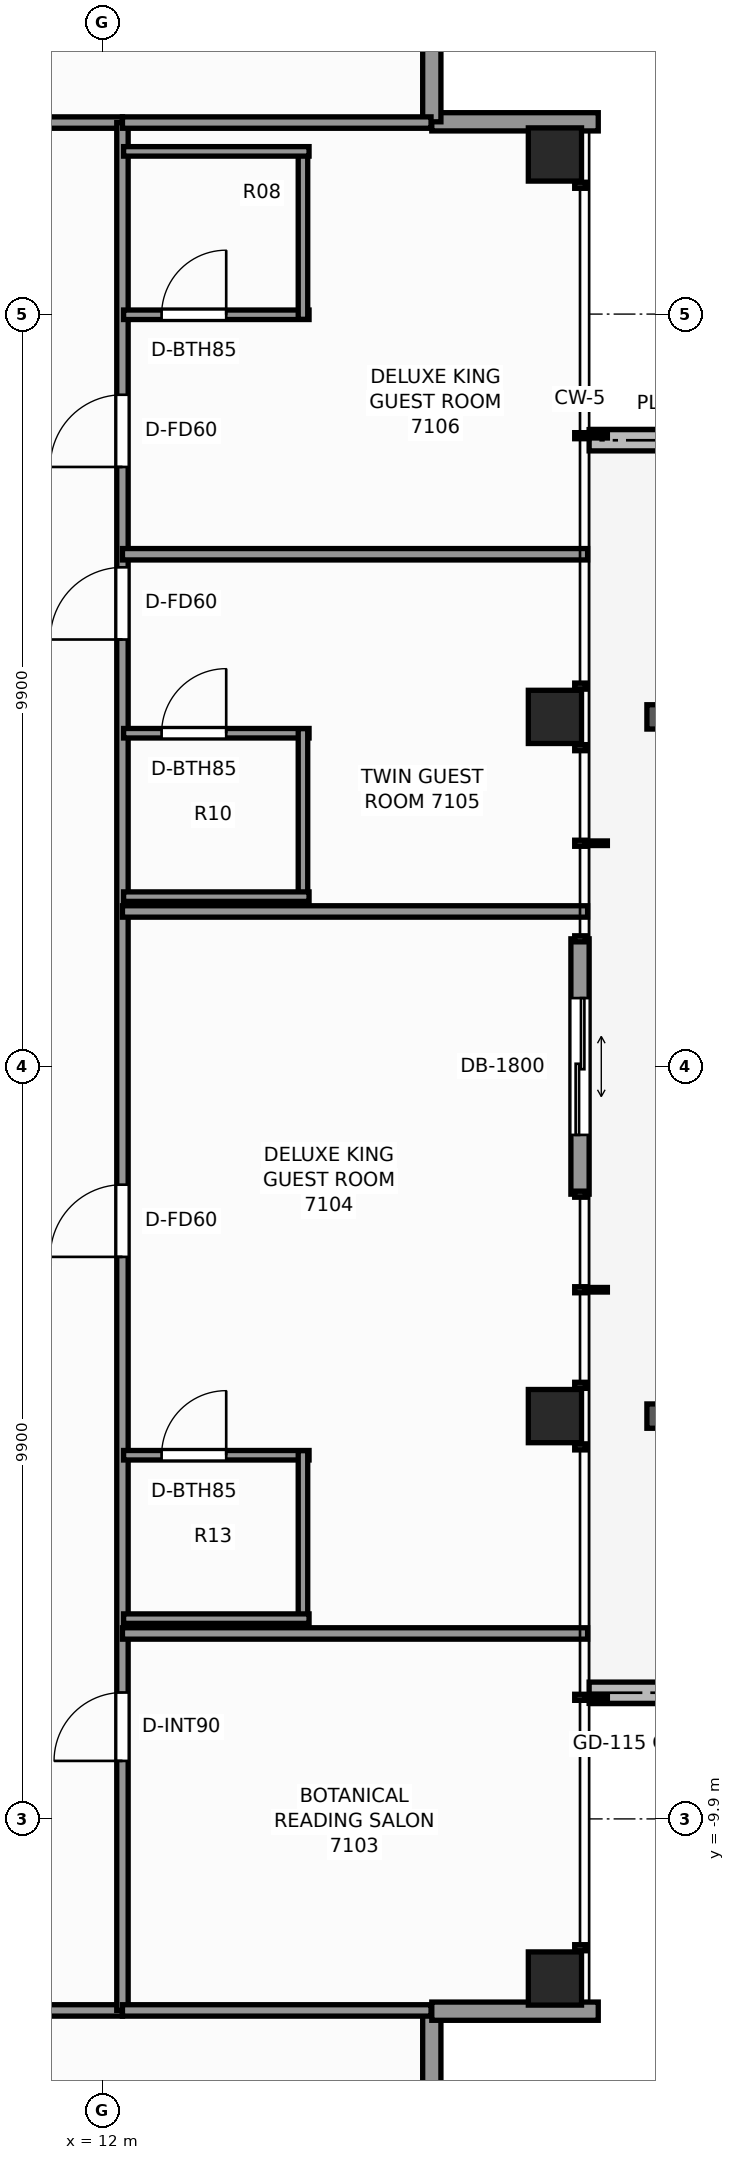
"""IFC4 building model, lengths in metres.
Left out: names, types, materials, properties, quantities, classifications, styles, units other than length and angle.
Written with IfcOpenShell. Run it as: python <this file> out.ifc"""

import sys

from ifc_helpers import new_model, si_unit, direction, frame, frame_2d, origin, origin_2d, place, context, subcontext, project, spatial, rectangle, extrude, element, fill, save


model = new_model("IFC4")
c1 = context("Model", 3, precision=1e-05, world=origin(), true_north=direction((0.0, 1.0)))
c2 = subcontext(c1, "Body", "Model", "MODEL_VIEW")
j1 = project(units=[si_unit("LENGTHUNIT", "METRE"), si_unit("PLANEANGLEUNIT", "RADIAN")], contexts=[c1])
p1 = place(None, origin())
s1 = spatial("IfcSite", under=j1, at=p1, CompositionType="ELEMENT")
p2 = place(p1, origin())
s2 = spatial("IfcBuilding", under=s1, at=p2, CompositionType="ELEMENT")
p3 = place(p2, frame((0.0, 0.0, 244.4)))
s3 = spatial("IfcBuildingStorey", under=s2, at=p3, CompositionType="ELEMENT", Elevation=244.4)
for number, where, z_axis, x_axis in (
    (1, (17.95, -12.0, 0.0), (0.0, 0.0, 1.0), (1.0, 0.0, 0.0)),
    (2, (17.95, -4.6, 0.0), (0.0, 0.0, 1.0), (1.0, 0.0, 0.0)),
    (3, (17.95, 4.6, 0.0), (0.0, 0.0, 1.0), (1.0, 0.0, 0.0)),
    (4, (17.95, 12.0, 0.0), (0.0, 0.0, 1.0), (1.0, 0.0, 0.0)),
):
    element("IfcColumn", number, at=place(p3, frame(where, z_axis=z_axis, x_axis=x_axis)), inside=s3, PredefinedType="COLUMN", context=c2, shape_type="SweptSolid", body=[
        extrude(rectangle(XDim=0.7, YDim=0.7, at=origin_2d()), origin(), (0.0, 0.0, 1.0), 3.5),
    ])
p4 = place(p3, frame((20.74, 8.24, -0.07), z_axis=(0.0, 0.0, 1.0), x_axis=(-1.0, 0.0, 0.0)))
e5 = element("IfcWall", 5, at=p4, inside=s3, PredefinedType="PARAPET", context=c2, shape_type="SweptSolid", body=[
    extrude(rectangle(XDim=2.34, YDim=0.28, at=frame_2d((1.17, 0.0))), origin(), (0.0, 0.0, 1.0), 0.42),
])
p5 = place(p3, frame((18.4, -8.24, -0.07), z_axis=(0.0, 0.0, 1.0), x_axis=(1.0, 0.0, 0.0)))
e6 = element("IfcWall", 6, at=p5, inside=s3, PredefinedType="PARAPET", context=c2, shape_type="SweptSolid", body=[
    extrude(rectangle(XDim=1.313, YDim=0.28, at=frame_2d((0.656, 0.0))), origin(), (0.0, 0.0, 1.0), 0.42),
])
p6 = place(p3, frame((16.33, -12.43, 0.0), z_axis=(0.0, 0.0, 1.0), x_axis=(0.0, -1.0, 0.0)))
e7 = element("IfcWall", 7, at=p6, inside=s3, PredefinedType="STANDARD", context=c2, shape_type="SweptSolid", body=[
    extrude(rectangle(XDim=2.19, YDim=0.24, at=frame_2d((1.095, 0.0))), origin(), (0.0, 0.0, 1.0), 2.633),
])
p7 = place(p3, frame((18.52, -12.43, 0.0), z_axis=(0.0, 0.0, 1.0), x_axis=(-1.0, 0.0, 0.0)))
e8 = element("IfcWall", 8, at=p7, inside=s3, PredefinedType="STANDARD", context=c2, shape_type="SweptSolid", body=[
    extrude(rectangle(XDim=2.19, YDim=0.24, at=frame_2d((1.095, 0.0))), origin(), (0.0, 0.0, 1.0), 2.633),
])
p8 = place(p3, frame((18.28, 1.68, 0.0), z_axis=(0.0, 0.0, 1.0), x_axis=(0.0, -1.0, 0.0)))
e9 = element("IfcWall", 9, at=p8, inside=s3, PredefinedType="STANDARD", context=c2, shape_type="SweptSolid", body=[
    extrude(rectangle(XDim=3.36, YDim=0.24, at=frame_2d((1.68, 0.0))), origin(), (0.0, 0.0, 1.0), 3.25),
])
p9 = place(p8, frame((0.78, 0.0, 0.0)))
e10 = element("IfcOpeningElement", 10, at=p9, cuts=e9, PredefinedType="OPENING", context=c2, shape_type="SweptSolid", body=[
    extrude(rectangle(XDim=1.8, YDim=2.2, at=frame_2d((0.9, 1.1))), frame((0.0, 0.13, 0.0), z_axis=(0.0, -1.0, 0.0), x_axis=(1.0, 0.0, 0.0)), (0.0, 0.0, 1.0), 0.26),
])
p10 = place(p3, frame((16.33, 12.43, 0.0), z_axis=(0.0, 0.0, 1.0), x_axis=(1.0, 0.0, 0.0)))
e11 = element("IfcWall", 11, at=p10, inside=s3, PredefinedType="STANDARD", context=c2, shape_type="SweptSolid", body=[
    extrude(rectangle(XDim=2.19, YDim=0.24, at=frame_2d((1.095, 0.0))), origin(), (0.0, 0.0, 1.0), 2.633),
])
p11 = place(p3, frame((16.33, 14.62, 0.0), z_axis=(0.0, 0.0, 1.0), x_axis=(0.0, -1.0, 0.0)))
e12 = element("IfcWall", 12, at=p11, inside=s3, PredefinedType="STANDARD", context=c2, shape_type="SweptSolid", body=[
    extrude(rectangle(XDim=2.19, YDim=0.24, at=frame_2d((1.095, 0.0))), origin(), (0.0, 0.0, 1.0), 2.633),
])
p12 = place(p3, frame((-12.58, -12.42, 0.0), z_axis=(0.0, 0.0, 1.0), x_axis=(1.0, 0.0, 0.0)))
e13 = element("IfcWall", 13, at=p12, inside=s3, PredefinedType="PARTITIONING", context=c2, shape_type="SweptSolid", body=[
    extrude(rectangle(XDim=24.84, YDim=0.15, at=frame_2d((12.42, 0.0))), origin(), (0.0, 0.0, 1.0), 2.539),
])
p13 = place(p12, frame((4.595, 0.0, 0.0)))
e14 = element("IfcOpeningElement", 14, at=p13, cuts=e13, PredefinedType="OPENING", context=c2, shape_type="SweptSolid", body=[
    extrude(rectangle(XDim=0.9, YDim=2.06, at=frame_2d((0.45, 1.03))), frame((0.0, 0.085, 0.0), z_axis=(0.0, -1.0, 0.0), x_axis=(1.0, 0.0, 0.0)), (0.0, 0.0, 1.0), 0.17),
])
p14 = place(p12, frame((13.406, 0.0, 0.0)))
e15 = element("IfcOpeningElement", 15, at=p14, cuts=e13, PredefinedType="OPENING", context=c2, shape_type="SweptSolid", body=[
    extrude(rectangle(XDim=0.9, YDim=2.06, at=frame_2d((0.45, 1.03))), frame((0.0, 0.085, 0.0), z_axis=(0.0, -1.0, 0.0), x_axis=(1.0, 0.0, 0.0)), (0.0, 0.0, 1.0), 0.17),
])
p15 = place(p12, frame((18.028, 0.0, 0.0)))
e16 = element("IfcOpeningElement", 16, at=p15, cuts=e13, PredefinedType="OPENING", context=c2, shape_type="SweptSolid", body=[
    extrude(rectangle(XDim=0.95, YDim=2.06, at=frame_2d((0.475, 1.03))), frame((0.0, 0.085, 0.0), z_axis=(0.0, -1.0, 0.0), x_axis=(1.0, 0.0, 0.0)), (0.0, 0.0, 1.0), 0.17),
])
p16 = place(p12, frame((20.478, 0.0, 0.0)))
e17 = element("IfcOpeningElement", 17, at=p16, cuts=e13, PredefinedType="OPENING", context=c2, shape_type="SweptSolid", body=[
    extrude(rectangle(XDim=0.9, YDim=2.06, at=frame_2d((0.45, 1.03))), frame((0.0, 0.085, 0.0), z_axis=(0.0, -1.0, 0.0), x_axis=(1.0, 0.0, 0.0)), (0.0, 0.0, 1.0), 0.17),
])
p17 = place(p3, frame((-12.58, 12.42, 0.0), z_axis=(0.0, 0.0, 1.0), x_axis=(1.0, 0.0, 0.0)))
e18 = element("IfcWall", 18, at=p17, inside=s3, PredefinedType="PARTITIONING", context=c2, shape_type="SweptSolid", body=[
    extrude(rectangle(XDim=24.84, YDim=0.15, at=frame_2d((12.42, 0.0))), origin(), (0.0, 0.0, 1.0), 2.539),
])
p18 = place(p17, frame((3.079, 0.0, 0.0)))
e19 = element("IfcOpeningElement", 19, at=p18, cuts=e18, PredefinedType="OPENING", context=c2, shape_type="SweptSolid", body=[
    extrude(rectangle(XDim=0.95, YDim=2.06, at=frame_2d((0.475, 1.03))), frame((0.0, 0.085, 0.0), z_axis=(0.0, -1.0, 0.0), x_axis=(1.0, 0.0, 0.0)), (0.0, 0.0, 1.0), 0.17),
])
p19 = place(p17, frame((10.075, 0.0, 0.0)))
e20 = element("IfcOpeningElement", 20, at=p19, cuts=e18, PredefinedType="OPENING", context=c2, shape_type="SweptSolid", body=[
    extrude(rectangle(XDim=0.95, YDim=2.06, at=frame_2d((0.475, 1.03))), frame((0.0, 0.085, 0.0), z_axis=(0.0, -1.0, 0.0), x_axis=(1.0, 0.0, 0.0)), (0.0, 0.0, 1.0), 0.17),
])
p20 = place(p17, frame((19.64, 0.0, 0.0)))
e21 = element("IfcOpeningElement", 21, at=p20, cuts=e18, PredefinedType="OPENING", context=c2, shape_type="SweptSolid", body=[
    extrude(rectangle(XDim=0.95, YDim=2.06, at=frame_2d((0.475, 1.03))), frame((0.0, 0.085, 0.0), z_axis=(0.0, -1.0, 0.0), x_axis=(1.0, 0.0, 0.0)), (0.0, 0.0, 1.0), 0.17),
])
p21 = place(p3, frame((12.26, -12.42, 0.0), z_axis=(0.0, 0.0, 1.0), x_axis=(0.0, 1.0, 0.0)))
e22 = element("IfcWall", 22, at=p21, inside=s3, PredefinedType="PARTITIONING", context=c2, shape_type="SweptSolid", body=[
    extrude(rectangle(XDim=24.84, YDim=0.15, at=frame_2d((12.42, 0.0))), origin(), (0.0, 0.0, 1.0), 2.539),
])
p22 = place(p21, frame((3.283, 0.0, 0.0)))
e23 = element("IfcOpeningElement", 23, at=p22, cuts=e22, PredefinedType="OPENING", context=c2, shape_type="SweptSolid", body=[
    extrude(rectangle(XDim=0.9, YDim=2.06, at=frame_2d((0.45, 1.03))), frame((0.0, 0.085, 0.0), z_axis=(0.0, -1.0, 0.0), x_axis=(1.0, 0.0, 0.0)), (0.0, 0.0, 1.0), 0.17),
])
p23 = place(p21, frame((9.915, 0.0, 0.0)))
e24 = element("IfcOpeningElement", 24, at=p23, cuts=e22, PredefinedType="OPENING", context=c2, shape_type="SweptSolid", body=[
    extrude(rectangle(XDim=0.95, YDim=2.06, at=frame_2d((0.475, 1.03))), frame((0.0, 0.085, 0.0), z_axis=(0.0, -1.0, 0.0), x_axis=(1.0, 0.0, 0.0)), (0.0, 0.0, 1.0), 0.17),
])
p24 = place(p21, frame((18.038, 0.0, 0.0)))
e25 = element("IfcOpeningElement", 25, at=p24, cuts=e22, PredefinedType="OPENING", context=c2, shape_type="SweptSolid", body=[
    extrude(rectangle(XDim=0.95, YDim=2.06, at=frame_2d((0.475, 1.03))), frame((0.0, 0.085, 0.0), z_axis=(0.0, -1.0, 0.0), x_axis=(1.0, 0.0, 0.0)), (0.0, 0.0, 1.0), 0.17),
])
p25 = place(p21, frame((20.309, 0.0, 0.0)))
e26 = element("IfcOpeningElement", 26, at=p25, cuts=e22, PredefinedType="OPENING", context=c2, shape_type="SweptSolid", body=[
    extrude(rectangle(XDim=0.95, YDim=2.06, at=frame_2d((0.475, 1.03))), frame((0.0, 0.085, 0.0), z_axis=(0.0, -1.0, 0.0), x_axis=(1.0, 0.0, 0.0)), (0.0, 0.0, 1.0), 0.17),
])
for number, where, z_axis, x_axis in (
    (27, (12.26, -12.42, 0.0), (0.0, 0.0, 1.0), (1.0, 0.0, 0.0)),
    (28, (12.26, 12.42, 0.0), (0.0, 0.0, 1.0), (1.0, 0.0, 0.0)),
):
    element("IfcWall", number, at=place(p3, frame(where, z_axis=z_axis, x_axis=x_axis)), inside=s3, PredefinedType="PARTITIONING", context=c2, shape_type="SweptSolid", body=[
        extrude(rectangle(XDim=4.06, YDim=0.15, at=frame_2d((2.03, 0.0))), origin(), (0.0, 0.0, 1.0), 3.25),
    ])
for number, where, z_axis, x_axis in (
    (29, (12.26, -7.46, 0.0), (0.0, 0.0, 1.0), (1.0, 0.0, 0.0)),
    (30, (12.26, 2.04, 0.0), (0.0, 0.0, 1.0), (1.0, 0.0, 0.0)),
):
    element("IfcWall", number, at=place(p3, frame(where, z_axis=z_axis, x_axis=x_axis)), inside=s3, PredefinedType="PARTITIONING", context=c2, shape_type="SweptSolid", body=[
        extrude(rectangle(XDim=6.12, YDim=0.15, at=frame_2d((3.06, 0.0))), origin(), (0.0, 0.0, 1.0), 2.623),
    ])
p26 = place(p3, frame((12.275, -5.115, 0.0), z_axis=(0.0, 0.0, 1.0), x_axis=(1.0, 0.0, 0.0)))
e31 = element("IfcWall", 31, at=p26, inside=s3, PredefinedType="PARTITIONING", context=c2, shape_type="SweptSolid", body=[
    extrude(rectangle(XDim=2.44, YDim=0.125, at=frame_2d((1.22, 0.0))), origin(), (0.0, 0.0, 1.0), 3.25),
])
p27 = place(p26, frame((0.5, 0.0, 0.0)))
e32 = element("IfcOpeningElement", 32, at=p27, cuts=e31, PredefinedType="OPENING", context=c2, shape_type="SweptSolid", body=[
    extrude(rectangle(XDim=0.85, YDim=2.03, at=frame_2d((0.425, 1.015))), frame((0.0, 0.073, 0.0), z_axis=(0.0, -1.0, 0.0), x_axis=(1.0, 0.0, 0.0)), (0.0, 0.0, 1.0), 0.145),
])
p28 = place(p3, frame((14.635, -7.325, 0.0), z_axis=(0.0, 0.0, 1.0), x_axis=(0.0, 1.0, 0.0)))
e33 = element("IfcWall", 33, at=p28, inside=s3, PredefinedType="PARTITIONING", context=c2, shape_type="SweptSolid", body=[
    extrude(rectangle(XDim=2.27, YDim=0.125, at=frame_2d((1.135, 0.0))), origin(), (0.0, 0.0, 1.0), 3.25),
])
p29 = place(p3, frame((12.275, -7.265, 0.0), z_axis=(0.0, 0.0, 1.0), x_axis=(1.0, 0.0, 0.0)))
e34 = element("IfcWall", 34, at=p29, inside=s3, PredefinedType="PARTITIONING", context=c2, shape_type="SweptSolid", body=[
    extrude(rectangle(XDim=2.44, YDim=0.125, at=frame_2d((1.22, 0.0))), origin(), (0.0, 0.0, 1.0), 3.25),
])
p30 = place(p3, frame((12.26, 6.74, 0.0), z_axis=(0.0, 0.0, 1.0), x_axis=(1.0, 0.0, 0.0)))
e35 = element("IfcWall", 35, at=p30, inside=s3, PredefinedType="PARTITIONING", context=c2, shape_type="SweptSolid", body=[
    extrude(rectangle(XDim=6.12, YDim=0.15, at=frame_2d((3.06, 0.0))), origin(), (0.0, 0.0, 1.0), 2.623),
])
p31 = place(p3, frame((12.275, 4.385, 0.0), z_axis=(0.0, 0.0, 1.0), x_axis=(1.0, 0.0, 0.0)))
e36 = element("IfcWall", 36, at=p31, inside=s3, PredefinedType="PARTITIONING", context=c2, shape_type="SweptSolid", body=[
    extrude(rectangle(XDim=2.44, YDim=0.125, at=frame_2d((1.22, 0.0))), origin(), (0.0, 0.0, 1.0), 2.539),
])
p32 = place(p31, frame((0.5, 0.0, 0.0)))
e37 = element("IfcOpeningElement", 37, at=p32, cuts=e36, PredefinedType="OPENING", context=c2, shape_type="SweptSolid", body=[
    extrude(rectangle(XDim=0.85, YDim=2.03, at=frame_2d((0.425, 1.015))), frame((0.0, 0.073, 0.0), z_axis=(0.0, -1.0, 0.0), x_axis=(1.0, 0.0, 0.0)), (0.0, 0.0, 1.0), 0.145),
])
p33 = place(p3, frame((14.635, 2.175, 0.0), z_axis=(0.0, 0.0, 1.0), x_axis=(0.0, 1.0, 0.0)))
e38 = element("IfcWall", 38, at=p33, inside=s3, PredefinedType="PARTITIONING", context=c2, shape_type="SweptSolid", body=[
    extrude(rectangle(XDim=2.27, YDim=0.125, at=frame_2d((1.135, 0.0))), origin(), (0.0, 0.0, 1.0), 2.539),
])
p34 = place(p3, frame((12.275, 2.235, 0.0), z_axis=(0.0, 0.0, 1.0), x_axis=(1.0, 0.0, 0.0)))
e39 = element("IfcWall", 39, at=p34, inside=s3, PredefinedType="PARTITIONING", context=c2, shape_type="SweptSolid", body=[
    extrude(rectangle(XDim=2.44, YDim=0.125, at=frame_2d((1.22, 0.0))), origin(), (0.0, 0.0, 1.0), 3.25),
])
p35 = place(p3, frame((12.275, 9.891, 0.0), z_axis=(0.0, 0.0, 1.0), x_axis=(1.0, 0.0, 0.0)))
e40 = element("IfcWall", 40, at=p35, inside=s3, PredefinedType="PARTITIONING", context=c2, shape_type="SweptSolid", body=[
    extrude(rectangle(XDim=2.44, YDim=0.125, at=frame_2d((1.22, 0.0))), origin(), (0.0, 0.0, 1.0), 3.25),
])
p36 = place(p35, frame((0.5, 0.0, 0.0)))
e41 = element("IfcOpeningElement", 41, at=p36, cuts=e40, PredefinedType="OPENING", context=c2, shape_type="SweptSolid", body=[
    extrude(rectangle(XDim=0.85, YDim=2.03, at=frame_2d((0.425, 1.015))), frame((0.0, 0.073, 0.0), z_axis=(0.0, -1.0, 0.0), x_axis=(1.0, 0.0, 0.0)), (0.0, 0.0, 1.0), 0.145),
])
p37 = place(p3, frame((14.635, 9.831, 0.0), z_axis=(0.0, 0.0, 1.0), x_axis=(0.0, 1.0, 0.0)))
e42 = element("IfcWall", 42, at=p37, inside=s3, PredefinedType="PARTITIONING", context=c2, shape_type="SweptSolid", body=[
    extrude(rectangle(XDim=2.27, YDim=0.125, at=frame_2d((1.135, 0.0))), origin(), (0.0, 0.0, 1.0), 2.539),
])
p38 = place(p3, frame((12.275, 12.041, 0.0), z_axis=(0.0, 0.0, 1.0), x_axis=(1.0, 0.0, 0.0)))
e43 = element("IfcWall", 43, at=p38, inside=s3, PredefinedType="PARTITIONING", context=c2, shape_type="SweptSolid", body=[
    extrude(rectangle(XDim=2.44, YDim=0.125, at=frame_2d((1.22, 0.0))), origin(), (0.0, 0.0, 1.0), 3.25),
])
p39 = place(p9, origin())
e44 = element("IfcDoor", 44, at=p39, inside=s3, OperationType="DOUBLE_DOOR_SLIDING", PredefinedType="DOOR", context=c2, shape_type="SweptSolid", body=[
    extrude(rectangle(XDim=1.8, YDim=2.2, at=frame_2d((0.9, 1.1))), frame((0.0, 0.025, 0.0), z_axis=(0.0, -1.0, 0.0), x_axis=(1.0, 0.0, 0.0)), (0.0, 0.0, 1.0), 0.05),
])
fill(e10, e44)
p40 = place(p22, origin())
e45 = element("IfcDoor", 45, at=p40, inside=s3, OperationType="SINGLE_SWING_LEFT", PredefinedType="DOOR", context=c2, shape_type="SweptSolid", body=[
    extrude(rectangle(XDim=0.9, YDim=2.06, at=frame_2d((0.45, 1.03))), frame((0.0, 0.025, 0.0), z_axis=(0.0, -1.0, 0.0), x_axis=(1.0, 0.0, 0.0)), (0.0, 0.0, 1.0), 0.05),
])
fill(e23, e45)
p41 = place(p27, origin())
e46 = element("IfcDoor", 46, at=p41, inside=s3, OperationType="SINGLE_SWING_RIGHT", PredefinedType="DOOR", context=c2, shape_type="SweptSolid", body=[
    extrude(rectangle(XDim=0.85, YDim=2.03, at=frame_2d((0.425, 1.015))), frame((0.0, 0.025, 0.0), z_axis=(0.0, -1.0, 0.0), x_axis=(1.0, 0.0, 0.0)), (0.0, 0.0, 1.0), 0.05),
])
fill(e32, e46)
p42 = place(p23, origin())
e47 = element("IfcDoor", 47, at=p42, inside=s3, OperationType="SINGLE_SWING_LEFT", PredefinedType="DOOR", context=c2, shape_type="SweptSolid", body=[
    extrude(rectangle(XDim=0.95, YDim=2.06, at=frame_2d((0.475, 1.03))), frame((0.0, 0.025, 0.0), z_axis=(0.0, -1.0, 0.0), x_axis=(1.0, 0.0, 0.0)), (0.0, 0.0, 1.0), 0.05),
])
fill(e24, e47)
p43 = place(p32, origin())
e48 = element("IfcDoor", 48, at=p43, inside=s3, OperationType="SINGLE_SWING_RIGHT", PredefinedType="DOOR", context=c2, shape_type="SweptSolid", body=[
    extrude(rectangle(XDim=0.85, YDim=2.03, at=frame_2d((0.425, 1.015))), frame((0.0, 0.025, 0.0), z_axis=(0.0, -1.0, 0.0), x_axis=(1.0, 0.0, 0.0)), (0.0, 0.0, 1.0), 0.05),
])
fill(e37, e48)
p44 = place(p24, origin())
e49 = element("IfcDoor", 49, at=p44, inside=s3, OperationType="SINGLE_SWING_LEFT", PredefinedType="DOOR", context=c2, shape_type="SweptSolid", body=[
    extrude(rectangle(XDim=0.95, YDim=2.06, at=frame_2d((0.475, 1.03))), frame((0.0, 0.025, 0.0), z_axis=(0.0, -1.0, 0.0), x_axis=(1.0, 0.0, 0.0)), (0.0, 0.0, 1.0), 0.05),
])
fill(e25, e49)
p45 = place(p36, origin())
e50 = element("IfcDoor", 50, at=p45, inside=s3, OperationType="SINGLE_SWING_RIGHT", PredefinedType="DOOR", context=c2, shape_type="SweptSolid", body=[
    extrude(rectangle(XDim=0.85, YDim=2.03, at=frame_2d((0.425, 1.015))), frame((0.0, 0.025, 0.0), z_axis=(0.0, -1.0, 0.0), x_axis=(1.0, 0.0, 0.0)), (0.0, 0.0, 1.0), 0.05),
])
fill(e41, e50)
p46 = place(p25, origin())
e51 = element("IfcDoor", 51, at=p46, inside=s3, OperationType="SINGLE_SWING_LEFT", PredefinedType="DOOR", context=c2, shape_type="SweptSolid", body=[
    extrude(rectangle(XDim=0.95, YDim=2.06, at=frame_2d((0.475, 1.03))), frame((0.0, 0.025, 0.0), z_axis=(0.0, -1.0, 0.0), x_axis=(1.0, 0.0, 0.0)), (0.0, 0.0, 1.0), 0.05),
])
fill(e26, e51)
save(model, sys.argv[1])
